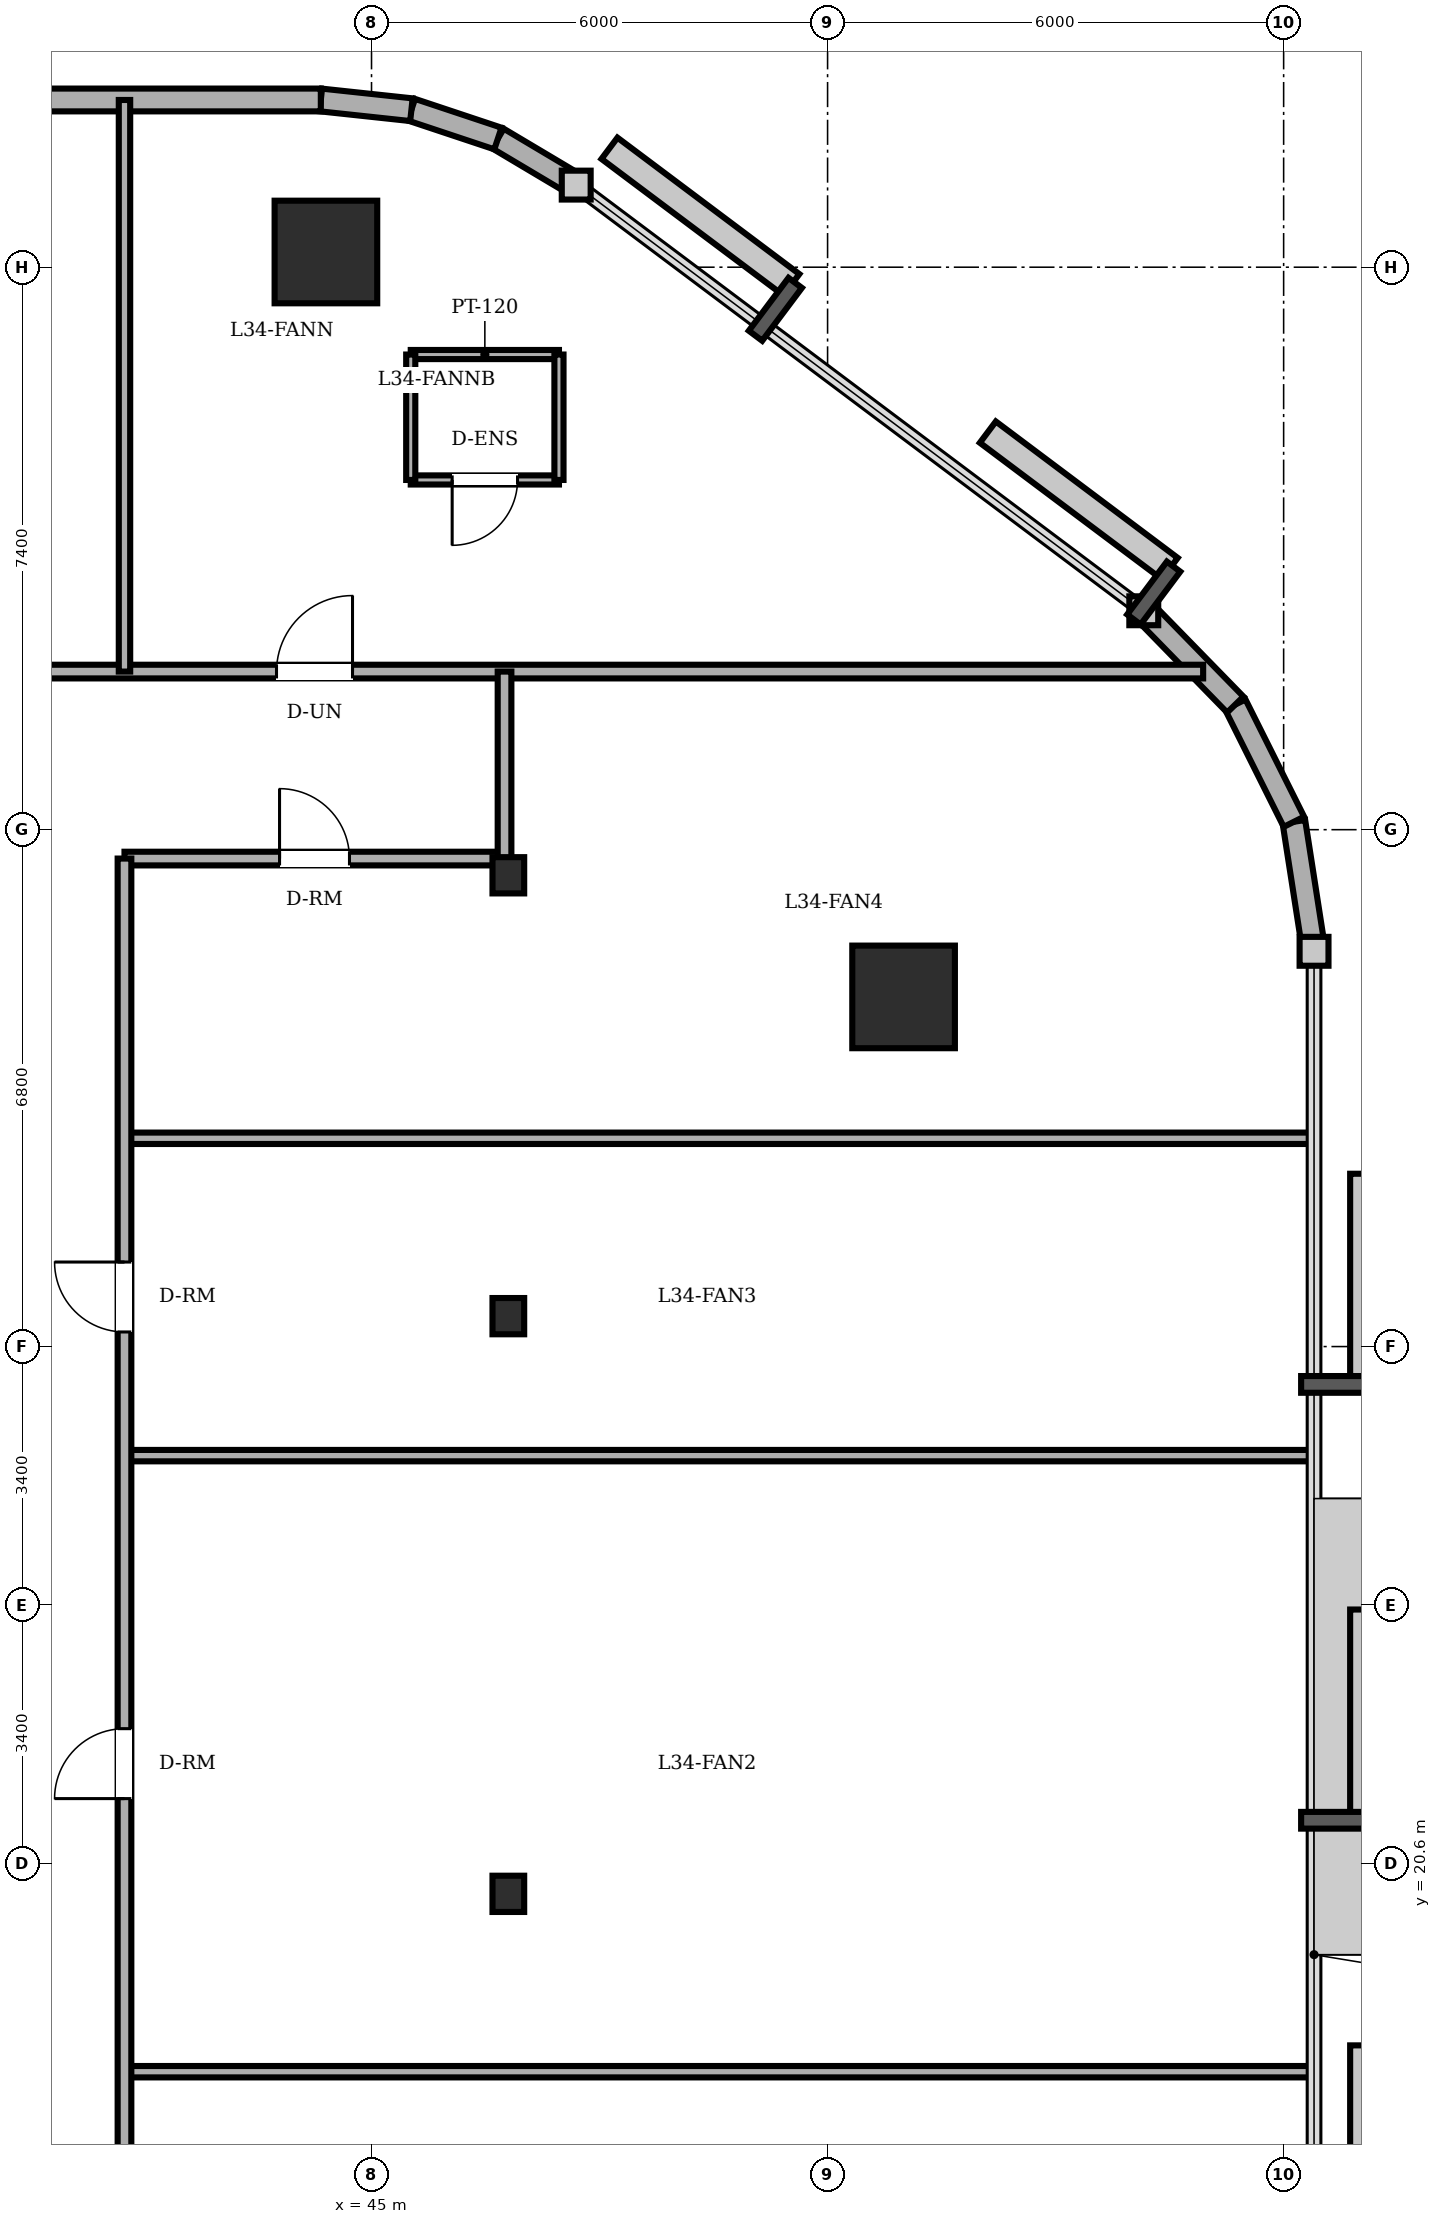
"""IFC4 building model, lengths in metres.
Left out: names, types, materials, properties, quantities, classifications, styles, units other than length and angle.
Written with IfcOpenShell. Run it as: python <this file> out.ifc"""

import sys

from ifc_helpers import new_model, si_unit, direction, frame, frame_2d, origin, origin_2d, place, context, subcontext, project, spatial, rectangle, circle, i_section, extrude, element, fill, save


model = new_model("IFC4")
c1 = context("Model", 3, precision=1e-05, world=origin(), true_north=direction((0.0, 1.0)))
c2 = subcontext(c1, "Body", "Model", "MODEL_VIEW")
j1 = project(units=[si_unit("LENGTHUNIT", "METRE"), si_unit("PLANEANGLEUNIT", "RADIAN")], contexts=[c1])
p1 = place(None, origin())
s1 = spatial("IfcSite", under=j1, at=p1, CompositionType="ELEMENT")
p2 = place(p1, origin())
s2 = spatial("IfcBuilding", under=s1, at=p2, CompositionType="ELEMENT")
p3 = place(p2, frame((0.0, 0.0, 129.5)))
s3 = spatial("IfcBuildingStorey", under=s2, at=p3, CompositionType="ELEMENT", Elevation=129.5)
for number, where, z_axis, x_axis in (
    (1, (52.0, 32.0, 0.0), (0.0, 0.0, 1.0), (1.0, 0.0, 0.0)),
    (2, (44.4, 41.8, 0.0), (0.0, 0.0, 1.0), (1.0, 0.0, 0.0)),
):
    element("IfcColumn", number, at=place(p3, frame(where, z_axis=z_axis, x_axis=x_axis)), inside=s3, PredefinedType="COLUMN", context=c2, shape_type="SweptSolid", body=[
        extrude(circle(Radius=0.675, at=origin_2d()), origin(), (0.0, 0.0, 1.0), 3.6),
    ])
for number, where, z_axis, x_axis in (
    (3, (46.8, 20.2, 0.0), (0.0, 0.0, 1.0), (1.0, 0.0, 0.0)),
    (4, (46.8, 27.8, 0.0), (0.0, 0.0, 1.0), (1.0, 0.0, 0.0)),
    (5, (46.8, 33.6, 0.0), (0.0, 0.0, 1.0), (1.0, 0.0, 0.0)),
):
    element("IfcColumn", number, at=place(p3, frame(where, z_axis=z_axis, x_axis=x_axis)), inside=s3, PredefinedType="COLUMN", context=c2, shape_type="SweptSolid", body=[
        extrude(i_section(OverallWidth=0.417, OverallDepth=0.477, WebThickness=0.036, FlangeThickness=0.057, FilletRadius=0.015, at=origin_2d()), origin(), (0.0, 0.0, 1.0), 3.6),
    ])
p4 = place(p3, frame((57.4, 32.6, 0.0), z_axis=(0.0, 0.0, 1.0), x_axis=(-0.153620989032, 0.988129845581, 0.0)))
e6 = element("IfcWall", 6, at=p4, inside=s3, PredefinedType="SOLIDWALL", context=c2, shape_type="SweptSolid", body=[
    extrude(rectangle(XDim=1.724, YDim=0.3, at=frame_2d((0.862, 0.0))), origin(), (0.0, 0.0, 1.0), 3.36),
])
for number, where, z_axis, x_axis in (
    (7, (57.135, 34.304, 0.0), (0.0, 0.0, 1.0), (-0.447, 0.894, 0.0)),
    (8, (56.364, 35.846, 0.0), (0.0, 0.0, 1.0), (-0.698, 0.716, 0.0)),
):
    element("IfcWall", number, at=place(p3, frame(where, z_axis=z_axis, x_axis=x_axis)), inside=s3, PredefinedType="SOLIDWALL", context=c2, shape_type="SweptSolid", body=[
        extrude(rectangle(XDim=1.724, YDim=0.3, at=frame_2d((0.862, 0.0))), origin(), (0.0, 0.0, 1.0), 3.36),
    ])
p5 = place(p3, frame((47.693, 42.68, 0.0), z_axis=(0.0, 0.0, 1.0), x_axis=(-0.859320591642, 0.511437308749, 0.0)))
e9 = element("IfcWall", 9, at=p5, inside=s3, PredefinedType="SOLIDWALL", context=c2, shape_type="SweptSolid", body=[
    extrude(rectangle(XDim=1.199, YDim=0.3, at=frame_2d((0.599, 0.0))), origin(), (0.0, 0.0, 1.0), 3.36),
])
p6 = place(p3, frame((46.663, 43.293, 0.0), z_axis=(0.0, 0.0, 1.0), x_axis=(-0.948744332129, 0.316044604847, 0.0)))
e10 = element("IfcWall", 10, at=p6, inside=s3, PredefinedType="SOLIDWALL", context=c2, shape_type="SweptSolid", body=[
    extrude(rectangle(XDim=1.2, YDim=0.3, at=frame_2d((0.6, 0.0))), origin(), (0.0, 0.0, 1.0), 3.36),
])
p7 = place(p3, frame((45.525, 43.672, 0.0), z_axis=(0.0, 0.0, 1.0), x_axis=(-0.994289103787, 0.106720092254, 0.0)))
e11 = element("IfcWall", 11, at=p7, inside=s3, PredefinedType="SOLIDWALL", context=c2, shape_type="SweptSolid", body=[
    extrude(rectangle(XDim=1.199, YDim=0.3, at=frame_2d((0.599, 0.0))), origin(), (0.0, 0.0, 1.0), 3.36),
])
p8 = place(p3, frame((44.333, 43.8, 0.0), z_axis=(0.0, 0.0, 1.0), x_axis=(-1.0, 0.0, 0.0)))
e12 = element("IfcWall", 12, at=p8, inside=s3, PredefinedType="SOLIDWALL", context=c2, shape_type="SweptSolid", body=[
    extrude(rectangle(XDim=29.933, YDim=0.3, at=frame_2d((14.967, 0.0))), origin(), (0.0, 0.0, 1.0), 3.36),
])
p9 = place(p8, frame((17.683, 0.0, 0.0)))
e13 = element("IfcOpeningElement", 13, at=p9, cuts=e12, PredefinedType="OPENING", context=c2, shape_type="SweptSolid", body=[
    extrude(rectangle(XDim=0.95, YDim=2.2, at=frame_2d((0.475, 1.1))), frame((0.0, 0.16, 0.0), z_axis=(0.0, -1.0, 0.0), x_axis=(1.0, 0.0, 0.0)), (0.0, 0.0, 1.0), 0.32),
])
p10 = place(p8, frame((5.075, 0.0, 0.85)))
e14 = element("IfcOpeningElement", 14, at=p10, cuts=e12, PredefinedType="OPENING", context=c2, shape_type="SweptSolid", body=[
    extrude(rectangle(XDim=1.65, YDim=1.55, at=frame_2d((0.825, 0.775))), frame((0.0, 0.16, 0.0), z_axis=(0.0, -1.0, 0.0), x_axis=(1.0, 0.0, 0.0)), (0.0, 0.0, 1.0), 0.32),
])
p11 = place(p8, frame((8.391, 0.0, 0.85)))
e15 = element("IfcOpeningElement", 15, at=p11, cuts=e12, PredefinedType="OPENING", context=c2, shape_type="SweptSolid", body=[
    extrude(rectangle(XDim=1.65, YDim=1.55, at=frame_2d((0.825, 0.775))), frame((0.0, 0.16, 0.0), z_axis=(0.0, -1.0, 0.0), x_axis=(1.0, 0.0, 0.0)), (0.0, 0.0, 1.0), 0.32),
])
p12 = place(p8, frame((14.108, 0.0, 0.85)))
e16 = element("IfcOpeningElement", 16, at=p12, cuts=e12, PredefinedType="OPENING", context=c2, shape_type="SweptSolid", body=[
    extrude(rectangle(XDim=1.65, YDim=1.55, at=frame_2d((0.825, 0.775))), frame((0.0, 0.16, 0.0), z_axis=(0.0, -1.0, 0.0), x_axis=(1.0, 0.0, 0.0)), (0.0, 0.0, 1.0), 0.32),
])
p13 = place(p8, frame((22.191, 0.0, 0.85)))
e17 = element("IfcOpeningElement", 17, at=p13, cuts=e12, PredefinedType="OPENING", context=c2, shape_type="SweptSolid", body=[
    extrude(rectangle(XDim=1.65, YDim=1.55, at=frame_2d((0.825, 0.775))), frame((0.0, 0.16, 0.0), z_axis=(0.0, -1.0, 0.0), x_axis=(1.0, 0.0, 0.0)), (0.0, 0.0, 1.0), 0.32),
])
p14 = place(p8, frame((25.475, 0.0, 0.85)))
e18 = element("IfcOpeningElement", 18, at=p14, cuts=e12, PredefinedType="OPENING", context=c2, shape_type="SweptSolid", body=[
    extrude(rectangle(XDim=1.65, YDim=1.55, at=frame_2d((0.825, 0.775))), frame((0.0, 0.16, 0.0), z_axis=(0.0, -1.0, 0.0), x_axis=(1.0, 0.0, 0.0)), (0.0, 0.0, 1.0), 0.32),
])
p15 = place(p3, frame((45.516, 40.451, 0.0), z_axis=(0.0, 0.0, 1.0), x_axis=(1.0, 0.0, 0.0)))
e19 = element("IfcWall", 19, at=p15, inside=s3, PredefinedType="PARTITIONING", context=c2, shape_type="SweptSolid", body=[
    extrude(rectangle(XDim=1.95, YDim=0.12, at=frame_2d((0.975, 0.0))), origin(), (0.0, 0.0, 1.0), 3.36),
])
p16 = place(p3, frame((47.466, 38.801, 0.0), z_axis=(0.0, 0.0, 1.0), x_axis=(-1.0, 0.0, 0.0)))
e20 = element("IfcWall", 20, at=p16, inside=s3, PredefinedType="PARTITIONING", context=c2, shape_type="SweptSolid", body=[
    extrude(rectangle(XDim=1.95, YDim=0.12, at=frame_2d((0.975, 0.0))), origin(), (0.0, 0.0, 1.0), 3.36),
])
p17 = place(p16, frame((0.545, 0.0, 0.0)))
e21 = element("IfcOpeningElement", 21, at=p17, cuts=e20, PredefinedType="OPENING", context=c2, shape_type="SweptSolid", body=[
    extrude(rectangle(XDim=0.86, YDim=2.1, at=frame_2d((0.43, 1.05))), frame((0.0, 0.07, 0.0), z_axis=(0.0, -1.0, 0.0), x_axis=(1.0, 0.0, 0.0)), (0.0, 0.0, 1.0), 0.14),
])
for number, where, z_axis, x_axis in (
    (22, (45.516, 40.451, 0.0), (0.0, 0.0, 1.0), (0.0, -1.0, 0.0)),
    (23, (47.466, 38.801, 0.0), (0.0, 0.0, 1.0), (0.0, 1.0, 0.0)),
):
    element("IfcWall", number, at=place(p3, frame(where, z_axis=z_axis, x_axis=x_axis)), inside=s3, PredefinedType="PARTITIONING", context=c2, shape_type="SweptSolid", body=[
        extrude(rectangle(XDim=1.65, YDim=0.12, at=frame_2d((0.825, 0.0))), origin(), (0.0, 0.0, 1.0), 3.36),
    ])
p18 = place(p3, frame((41.75, 17.86, 0.0), z_axis=(0.0, 0.0, 1.0), x_axis=(1.0, 0.0, 0.0)))
e24 = element("IfcWall", 24, at=p18, inside=s3, PredefinedType="PARTITIONING", context=c2, shape_type="SweptSolid", body=[
    extrude(rectangle(XDim=15.65, YDim=0.15, at=frame_2d((7.825, 0.0))), origin(), (0.0, 0.0, 1.0), 3.36),
])
p19 = place(p3, frame((41.75, 25.965, 0.0), z_axis=(0.0, 0.0, 1.0), x_axis=(1.0, 0.0, 0.0)))
e25 = element("IfcWall", 25, at=p19, inside=s3, PredefinedType="PARTITIONING", context=c2, shape_type="SweptSolid", body=[
    extrude(rectangle(XDim=15.65, YDim=0.15, at=frame_2d((7.825, 0.0))), origin(), (0.0, 0.0, 1.0), 3.012),
])
p20 = place(p3, frame((41.75, 30.14, 0.0), z_axis=(0.0, 0.0, 1.0), x_axis=(1.0, 0.0, 0.0)))
e26 = element("IfcWall", 26, at=p20, inside=s3, PredefinedType="PARTITIONING", context=c2, shape_type="SweptSolid", body=[
    extrude(rectangle(XDim=15.65, YDim=0.15, at=frame_2d((7.825, 0.0))), origin(), (0.0, 0.0, 1.0), 3.36),
])
p21 = place(p3, frame((41.75, 33.82, 0.0), z_axis=(0.0, 0.0, 1.0), x_axis=(1.0, 0.0, 0.0)))
e27 = element("IfcWall", 27, at=p21, inside=s3, PredefinedType="PARTITIONING", context=c2, shape_type="SweptSolid", body=[
    extrude(rectangle(XDim=5.0, YDim=0.18, at=frame_2d((2.5, 0.0))), origin(), (0.0, 0.0, 1.0), 2.842),
])
p22 = place(p21, frame((2.04, 0.0, 0.0)))
e28 = element("IfcOpeningElement", 28, at=p22, cuts=e27, PredefinedType="OPENING", context=c2, shape_type="SweptSolid", body=[
    extrude(rectangle(XDim=0.92, YDim=2.1, at=frame_2d((0.46, 1.05))), frame((0.0, 0.1, 0.0), z_axis=(0.0, -1.0, 0.0), x_axis=(1.0, 0.0, 0.0)), (0.0, 0.0, 1.0), 0.2),
])
p23 = place(p3, frame((8.8, 36.28, 0.0), z_axis=(0.0, 0.0, 1.0), x_axis=(1.0, 0.0, 0.0)))
e29 = element("IfcWall", 29, at=p23, inside=s3, PredefinedType="PARTITIONING", context=c2, shape_type="SweptSolid", body=[
    extrude(rectangle(XDim=47.141, YDim=0.18, at=frame_2d((23.57, 0.0))), origin(), (0.0, 0.0, 1.0), 3.36),
])
p24 = place(p23, frame((17.05, 0.0, 0.0)))
e30 = element("IfcOpeningElement", 30, at=p24, cuts=e29, PredefinedType="OPENING", context=c2, shape_type="SweptSolid", body=[
    extrude(rectangle(XDim=0.9, YDim=2.1, at=frame_2d((0.45, 1.05))), frame((0.0, 0.1, 0.0), z_axis=(0.0, -1.0, 0.0), x_axis=(1.0, 0.0, 0.0)), (0.0, 0.0, 1.0), 0.2),
])
p25 = place(p23, frame((20.67, 0.0, 0.0)))
e31 = element("IfcOpeningElement", 31, at=p25, cuts=e29, PredefinedType="OPENING", context=c2, shape_type="SweptSolid", body=[
    extrude(rectangle(XDim=0.86, YDim=2.1, at=frame_2d((0.43, 1.05))), frame((0.0, 0.1, 0.0), z_axis=(0.0, -1.0, 0.0), x_axis=(1.0, 0.0, 0.0)), (0.0, 0.0, 1.0), 0.2),
])
p26 = place(p23, frame((34.95, 0.0, 0.0)))
e32 = element("IfcOpeningElement", 32, at=p26, cuts=e29, PredefinedType="OPENING", context=c2, shape_type="SweptSolid", body=[
    extrude(rectangle(XDim=1.0, YDim=2.15, at=frame_2d((0.5, 1.075))), frame((0.0, 0.1, 0.0), z_axis=(0.0, -1.0, 0.0), x_axis=(1.0, 0.0, 0.0)), (0.0, 0.0, 1.0), 0.2),
])
p27 = place(p23, frame((8.0, 0.0, 0.0)))
e33 = element("IfcOpeningElement", 33, at=p27, cuts=e29, PredefinedType="OPENING", context=c2, shape_type="SweptSolid", body=[
    extrude(rectangle(XDim=1.0, YDim=2.15, at=frame_2d((0.5, 1.075))), frame((0.0, 0.1, 0.0), z_axis=(0.0, -1.0, 0.0), x_axis=(1.0, 0.0, 0.0)), (0.0, 0.0, 1.0), 0.2),
])
p28 = place(p23, frame((27.515, 0.0, 0.0)))
e34 = element("IfcOpeningElement", 34, at=p28, cuts=e29, PredefinedType="OPENING", context=c2, shape_type="SweptSolid", body=[
    extrude(rectangle(XDim=0.92, YDim=2.1, at=frame_2d((0.46, 1.05))), frame((0.0, 0.1, 0.0), z_axis=(0.0, -1.0, 0.0), x_axis=(1.0, 0.0, 0.0)), (0.0, 0.0, 1.0), 0.2),
])
p29 = place(p3, frame((41.75, 14.18, 0.0), z_axis=(0.0, 0.0, 1.0), x_axis=(0.0, 1.0, 0.0)))
e35 = element("IfcWall", 35, at=p29, inside=s3, PredefinedType="PARTITIONING", context=c2, shape_type="SweptSolid", body=[
    extrude(rectangle(XDim=19.64, YDim=0.18, at=frame_2d((9.82, 0.0))), origin(), (0.0, 0.0, 1.0), 3.36),
])
p30 = place(p29, frame((7.273, 0.0, 0.0)))
e36 = element("IfcOpeningElement", 36, at=p30, cuts=e35, PredefinedType="OPENING", context=c2, shape_type="SweptSolid", body=[
    extrude(rectangle(XDim=0.92, YDim=2.1, at=frame_2d((0.46, 1.05))), frame((0.0, 0.1, 0.0), z_axis=(0.0, -1.0, 0.0), x_axis=(1.0, 0.0, 0.0)), (0.0, 0.0, 1.0), 0.2),
])
p31 = place(p29, frame((13.412, 0.0, 0.0)))
e37 = element("IfcOpeningElement", 37, at=p31, cuts=e35, PredefinedType="OPENING", context=c2, shape_type="SweptSolid", body=[
    extrude(rectangle(XDim=0.92, YDim=2.1, at=frame_2d((0.46, 1.05))), frame((0.0, 0.1, 0.0), z_axis=(0.0, -1.0, 0.0), x_axis=(1.0, 0.0, 0.0)), (0.0, 0.0, 1.0), 0.2),
])
p32 = place(p3, frame((41.75, 36.28, 0.0), z_axis=(0.0, 0.0, 1.0), x_axis=(0.0, 1.0, 0.0)))
e38 = element("IfcWall", 38, at=p32, inside=s3, PredefinedType="PARTITIONING", context=c2, shape_type="SweptSolid", body=[
    extrude(rectangle(XDim=7.52, YDim=0.15, at=frame_2d((3.76, 0.0))), origin(), (0.0, 0.0, 1.0), 3.36),
])
p33 = place(p3, frame((46.75, 33.82, 0.0), z_axis=(0.0, 0.0, 1.0), x_axis=(0.0, 1.0, 0.0)))
e39 = element("IfcWall", 39, at=p33, inside=s3, PredefinedType="PARTITIONING", context=c2, shape_type="SweptSolid", body=[
    extrude(rectangle(XDim=2.46, YDim=0.18, at=frame_2d((1.23, 0.0))), origin(), (0.0, 0.0, 1.0), 2.842),
])
p34 = place(p17, origin())
e40 = element("IfcDoor", 40, at=p34, inside=s3, OperationType="SINGLE_SWING_RIGHT", PredefinedType="DOOR", context=c2, shape_type="SweptSolid", body=[
    extrude(rectangle(XDim=0.86, YDim=2.1, at=frame_2d((0.43, 1.05))), frame((0.0, 0.025, 0.0), z_axis=(0.0, -1.0, 0.0), x_axis=(1.0, 0.0, 0.0)), (0.0, 0.0, 1.0), 0.05),
])
fill(e21, e40)
p35 = place(p30, origin())
e41 = element("IfcDoor", 41, at=p35, inside=s3, OperationType="SINGLE_SWING_LEFT", PredefinedType="DOOR", context=c2, shape_type="SweptSolid", body=[
    extrude(rectangle(XDim=0.92, YDim=2.1, at=frame_2d((0.46, 1.05))), frame((0.0, 0.025, 0.0), z_axis=(0.0, -1.0, 0.0), x_axis=(1.0, 0.0, 0.0)), (0.0, 0.0, 1.0), 0.05),
])
fill(e36, e41)
p36 = place(p31, origin())
e42 = element("IfcDoor", 42, at=p36, inside=s3, OperationType="SINGLE_SWING_RIGHT", PredefinedType="DOOR", context=c2, shape_type="SweptSolid", body=[
    extrude(rectangle(XDim=0.92, YDim=2.1, at=frame_2d((0.46, 1.05))), frame((0.0, 0.025, 0.0), z_axis=(0.0, -1.0, 0.0), x_axis=(1.0, 0.0, 0.0)), (0.0, 0.0, 1.0), 0.05),
])
fill(e37, e42)
p37 = place(p22, origin())
e43 = element("IfcDoor", 43, at=p37, inside=s3, OperationType="SINGLE_SWING_LEFT", PredefinedType="DOOR", context=c2, shape_type="SweptSolid", body=[
    extrude(rectangle(XDim=0.92, YDim=2.1, at=frame_2d((0.46, 1.05))), frame((0.0, 0.025, 0.0), z_axis=(0.0, -1.0, 0.0), x_axis=(1.0, 0.0, 0.0)), (0.0, 0.0, 1.0), 0.05),
])
fill(e28, e43)
p38 = place(p26, origin())
e44 = element("IfcDoor", 44, at=p38, inside=s3, OperationType="SINGLE_SWING_RIGHT", PredefinedType="DOOR", context=c2, shape_type="SweptSolid", body=[
    extrude(rectangle(XDim=1.0, YDim=2.15, at=frame_2d((0.5, 1.075))), frame((0.0, 0.025, 0.0), z_axis=(0.0, -1.0, 0.0), x_axis=(1.0, 0.0, 0.0)), (0.0, 0.0, 1.0), 0.05),
])
fill(e32, e44)
save(model, sys.argv[1])
